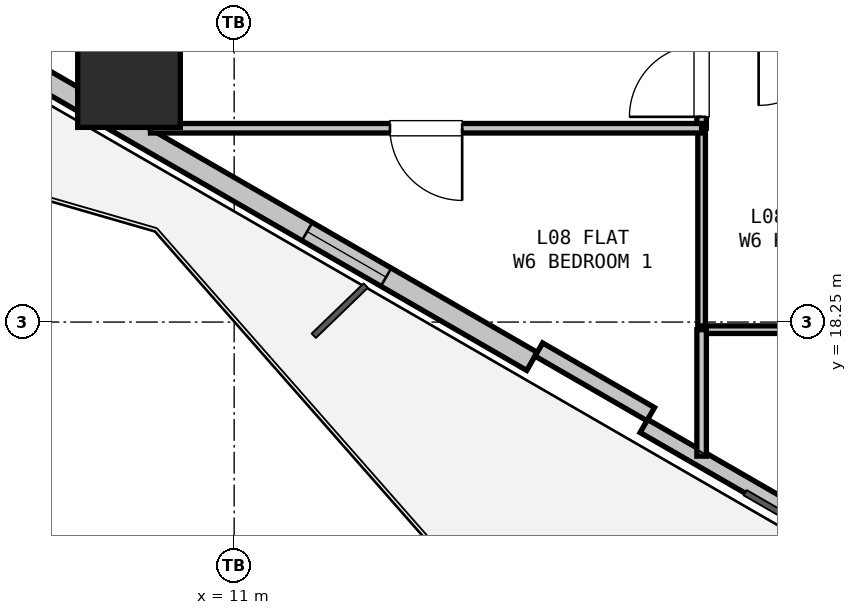
"""IFC4 building model, lengths in metres.
Left out: names, types, materials, properties, quantities, classifications, styles, units other than length and angle.
Written with IfcOpenShell. Run it as: python <this file> out.ifc"""

import sys

from ifc_helpers import new_model, si_unit, direction, frame, frame_2d, origin, origin_2d, place, context, subcontext, project, spatial, rectangle, hollow_rectangle, extrude, element, fill, save


model = new_model("IFC4")
c1 = context("Model", 3, precision=1e-05, world=origin(), true_north=direction((0.0, 1.0)))
c2 = subcontext(c1, "Body", "Model", "MODEL_VIEW")
j1 = project(units=[si_unit("LENGTHUNIT", "METRE"), si_unit("PLANEANGLEUNIT", "RADIAN")], contexts=[c1])
p1 = place(None, origin())
s1 = spatial("IfcSite", under=j1, at=p1, CompositionType="ELEMENT")
p2 = place(p1, origin())
s2 = spatial("IfcBuilding", under=s1, at=p2, CompositionType="ELEMENT")
p3 = place(p2, frame((0.0, 0.0, 32.4)))
s3 = spatial("IfcBuildingStorey", under=s2, at=p3, CompositionType="ELEMENT", Elevation=32.4)
p4 = place(p3, frame((9.617, 21.486, 0.0), z_axis=(0.0, 0.0, 1.0), x_axis=(1.0, 0.0, 0.0)))
e1 = element("IfcColumn", 1, at=p4, inside=s3, PredefinedType="COLUMN", context=c2, shape_type="SweptSolid", body=[
    extrude(hollow_rectangle(XDim=1.35, YDim=1.35, WallThickness=0.036, at=origin_2d()), origin(), (0.0, 0.0, 1.0), 3.3),
])
p5 = place(p3, frame((26.76, 10.896, 0.0), z_axis=(0.0, 0.0, 1.0), x_axis=(-0.866027351828, 0.499996625875, 0.0)))
e2 = element("IfcWall", 2, at=p5, inside=s3, PredefinedType="PARAPET", context=c2, shape_type="SweptSolid", body=[
    extrude(rectangle(XDim=11.973, YDim=0.2, at=frame_2d((5.987, 0.0))), origin(), (0.0, 0.0, 1.0), 0.2),
])
p6 = place(p3, frame((14.918, 17.733, 0.0), z_axis=(0.0, 0.0, 1.0), x_axis=(-0.866027105532, 0.499997052475, 0.0)))
e3 = element("IfcWall", 3, at=p6, inside=s3, PredefinedType="SOLIDWALL", context=c2, shape_type="SweptSolid", body=[
    extrude(rectangle(XDim=12.673, YDim=0.275, at=frame_2d((6.336, 0.0))), origin(), (0.0, 0.0, 1.0), 2.66),
])
p7 = place(p6, frame((2.216, 0.0, 0.9)))
e4 = element("IfcOpeningElement", 4, at=p7, cuts=e3, PredefinedType="OPENING", context=c2, shape_type="SweptSolid", body=[
    extrude(rectangle(XDim=1.2, YDim=1.4, at=frame_2d((0.6, 0.7))), frame((0.0, 0.147, 0.0), z_axis=(0.0, -1.0, 0.0), x_axis=(1.0, 0.0, 0.0)), (0.0, 0.0, 1.0), 0.295),
])
p8 = place(p3, frame((16.48, 17.039, 0.0), z_axis=(0.0, 0.0, 1.0), x_axis=(-0.86605165483, 0.499954529098, 0.0)))
e5 = element("IfcWall", 5, at=p8, inside=s3, PredefinedType="PARAPET", context=c2, shape_type="SweptSolid", body=[
    extrude(rectangle(XDim=1.7, YDim=0.2, at=frame_2d((0.85, 0.0))), origin(), (0.0, 0.0, 1.0), 2.66),
])
p9 = place(p3, frame((17.15, 18.15, 0.0), z_axis=(0.0, 0.0, 1.0), x_axis=(0.0, 1.0, 0.0)))
e6 = element("IfcWall", 6, at=p9, inside=s3, PredefinedType="PARTITIONING", context=c2, shape_type="SweptSolid", body=[
    extrude(rectangle(XDim=2.65, YDim=0.1, at=frame_2d((1.325, 0.0))), origin(), (0.0, 0.0, 1.0), 3.04),
])
p10 = place(p3, frame((17.15, 20.8, 0.0), z_axis=(0.0, 0.0, 1.0), x_axis=(0.0, 1.0, 0.0)))
e7 = element("IfcWall", 7, at=p10, inside=s3, PredefinedType="PARTITIONING", context=c2, shape_type="SweptSolid", body=[
    extrude(rectangle(XDim=1.25, YDim=0.125, at=frame_2d((0.625, 0.0))), origin(), (0.0, 0.0, 1.0), 2.338),
])
p11 = place(p10, frame((0.15, 0.0, 0.0)))
e8 = element("IfcOpeningElement", 8, at=p11, cuts=e7, PredefinedType="OPENING", context=c2, shape_type="SweptSolid", body=[
    extrude(rectangle(XDim=0.95, YDim=2.1, at=frame_2d((0.475, 1.05))), frame((0.0, 0.073, 0.0), z_axis=(0.0, -1.0, 0.0), x_axis=(1.0, 0.0, 0.0)), (0.0, 0.0, 1.0), 0.145),
])
p12 = place(p3, frame((19.6, 18.15, 0.0), z_axis=(0.0, 0.0, 1.0), x_axis=(-1.0, 0.0, 0.0)))
e9 = element("IfcWall", 9, at=p12, inside=s3, PredefinedType="PARTITIONING", context=c2, shape_type="SweptSolid", body=[
    extrude(rectangle(XDim=2.45, YDim=0.1, at=frame_2d((1.225, 0.0))), origin(), (0.0, 0.0, 1.0), 3.04),
])
p13 = place(p3, frame((17.15, 20.8, 0.0), z_axis=(0.0, 0.0, 1.0), x_axis=(-1.0, 0.0, 0.0)))
e10 = element("IfcWall", 10, at=p13, inside=s3, PredefinedType="PARTITIONING", context=c2, shape_type="SweptSolid", body=[
    extrude(rectangle(XDim=7.25, YDim=0.125, at=frame_2d((3.625, 0.0))), origin(), (0.0, 0.0, 1.0), 2.365),
])
p14 = place(p13, frame((3.15, 0.0, 0.0)))
e11 = element("IfcOpeningElement", 11, at=p14, cuts=e10, PredefinedType="OPENING", context=c2, shape_type="SweptSolid", body=[
    extrude(rectangle(XDim=0.95, YDim=2.1, at=frame_2d((0.475, 1.05))), frame((0.0, 0.073, 0.0), z_axis=(0.0, -1.0, 0.0), x_axis=(1.0, 0.0, 0.0)), (0.0, 0.0, 1.0), 0.145),
])
p15 = place(p3, frame((17.15, 18.15, 0.0), z_axis=(0.0, 0.0, 1.0), x_axis=(0.0, -1.0, 0.0)))
e12 = element("IfcWall", 12, at=p15, inside=s3, PredefinedType="PARTITIONING", context=c2, shape_type="SweptSolid", body=[
    extrude(rectangle(XDim=1.664, YDim=0.125, at=frame_2d((0.832, 0.0))), origin(), (0.0, 0.0, 1.0), 2.365),
])
p16 = place(p7, origin())
e13 = element("IfcWindow", 13, at=p16, inside=s3, PartitioningType="SINGLE_PANEL", PredefinedType="WINDOW", context=c2, shape_type="SweptSolid", body=[
    extrude(rectangle(XDim=1.2, YDim=1.4, at=frame_2d((0.6, 0.7))), frame((0.0, 0.03, 0.0), z_axis=(0.0, -1.0, 0.0), x_axis=(1.0, 0.0, 0.0)), (0.0, 0.0, 1.0), 0.06),
])
fill(e4, e13)
p17 = place(p11, origin())
e14 = element("IfcDoor", 14, at=p17, inside=s3, OperationType="SINGLE_SWING_LEFT", PredefinedType="DOOR", context=c2, shape_type="SweptSolid", body=[
    extrude(rectangle(XDim=0.95, YDim=2.1, at=frame_2d((0.475, 1.05))), frame((0.0, 0.025, 0.0), z_axis=(0.0, -1.0, 0.0), x_axis=(1.0, 0.0, 0.0)), (0.0, 0.0, 1.0), 0.05),
])
fill(e8, e14)
p18 = place(p14, origin())
e15 = element("IfcDoor", 15, at=p18, inside=s3, OperationType="SINGLE_SWING_LEFT", PredefinedType="DOOR", context=c2, shape_type="SweptSolid", body=[
    extrude(rectangle(XDim=0.95, YDim=2.1, at=frame_2d((0.475, 1.05))), frame((0.0, 0.025, 0.0), z_axis=(0.0, -1.0, 0.0), x_axis=(1.0, 0.0, 0.0)), (0.0, 0.0, 1.0), 0.05),
])
fill(e11, e15)
save(model, sys.argv[1])
